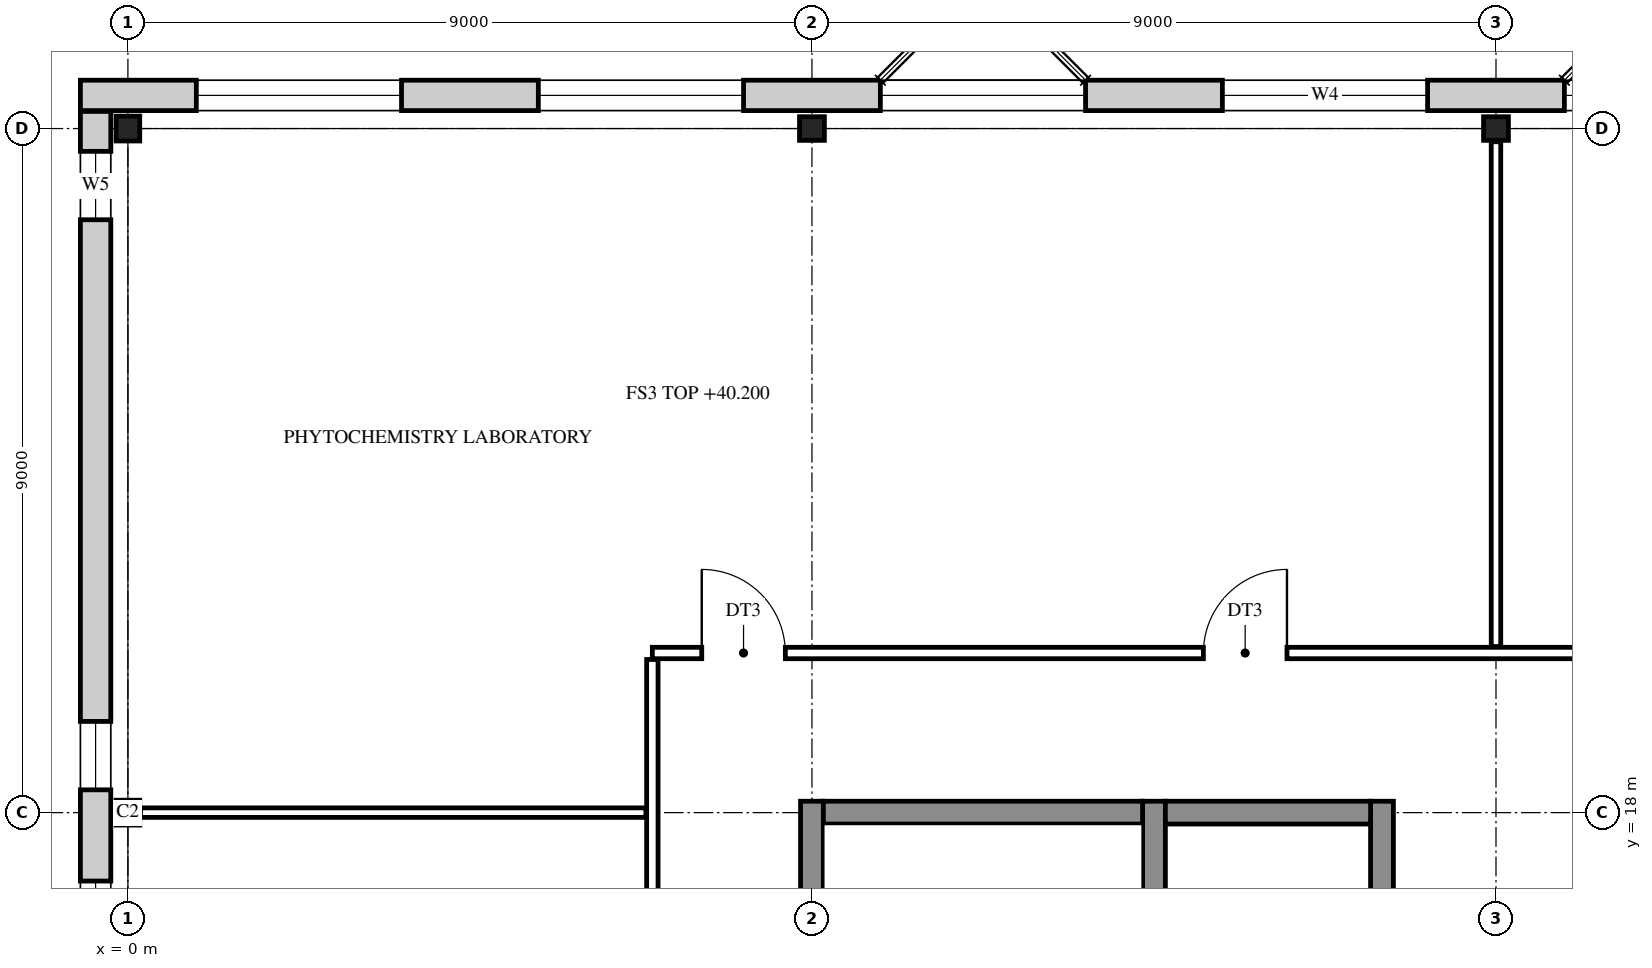
"""IFC4 building model, lengths in metres.
Left out: names, types, materials, properties, quantities, classifications, styles, units other than length and angle.
Written with IfcOpenShell. Run it as: python <this file> out.ifc"""

import sys

from ifc_helpers import new_model, si_unit, direction, frame, frame_2d, origin, origin_2d, place, context, subcontext, project, spatial, rectangle, i_section, extrude, element, fill, save


model = new_model("IFC4")
c1 = context("Model", 3, precision=1e-05, world=origin(), true_north=direction((0.0, 1.0)))
c2 = subcontext(c1, "Body", "Model", "MODEL_VIEW")
j1 = project(units=[si_unit("LENGTHUNIT", "METRE"), si_unit("PLANEANGLEUNIT", "RADIAN")], contexts=[c1])
p1 = place(None, origin())
s1 = spatial("IfcSite", under=j1, at=p1, CompositionType="ELEMENT")
p2 = place(p1, origin())
s2 = spatial("IfcBuilding", under=s1, at=p2, CompositionType="ELEMENT")
p3 = place(p2, frame((0.0, 0.0, 40.2)))
s3 = spatial("IfcBuildingStorey", under=s2, at=p3, CompositionType="ELEMENT", Elevation=40.2)
for number, where, z_axis, x_axis in (
    (1, (0.0, 18.0, 0.0), (0.0, 0.0, 1.0), (1.0, 0.0, 0.0)),
    (2, (0.0, 27.0, 0.0), (0.0, 0.0, 1.0), (1.0, 0.0, 0.0)),
    (3, (9.0, 27.0, 0.0), (0.0, 0.0, 1.0), (0.0, 1.0, 0.0)),
    (4, (18.0, 27.0, 0.0), (0.0, 0.0, 1.0), (0.0, 1.0, 0.0)),
):
    element("IfcColumn", number, at=place(p3, frame(where, z_axis=z_axis, x_axis=x_axis)), inside=s3, PredefinedType="COLUMN", context=c2, shape_type="SweptSolid", body=[
        extrude(i_section(OverallWidth=0.311, OverallDepth=0.327, WebThickness=0.016, FlangeThickness=0.025, FilletRadius=0.017, at=origin_2d()), origin(), (0.0, 0.0, 1.0), 4.2),
    ])
for number, where, z_axis, x_axis in (
    (5, (9.0, 8.85, 0.0), (0.0, 0.0, 1.0), (0.0, 1.0, 0.0)),
    (6, (13.5, 8.85, 0.0), (0.0, 0.0, 1.0), (0.0, 1.0, 0.0)),
):
    element("IfcWall", number, at=place(p3, frame(where, z_axis=z_axis, x_axis=x_axis)), inside=s3, PredefinedType="SHEAR", context=c2, shape_type="SweptSolid", body=[
        extrude(rectangle(XDim=9.3, YDim=0.3, at=frame_2d((4.65, 0.0))), origin(), (0.0, 0.0, 1.0), 4.2),
    ])
p4 = place(p3, frame((16.5, 8.85, 0.0), z_axis=(0.0, 0.0, 1.0), x_axis=(0.0, 1.0, 0.0)))
e7 = element("IfcWall", 7, at=p4, inside=s3, PredefinedType="SHEAR", context=c2, shape_type="SweptSolid", body=[
    extrude(rectangle(XDim=9.3, YDim=0.3, at=frame_2d((4.65, 0.0))), origin(), (0.0, 0.0, 1.0), 4.2),
])
p5 = place(p4, frame((1.1, 0.0, 0.0)))
e8 = element("IfcOpeningElement", 8, at=p5, cuts=e7, PredefinedType="OPENING", context=c2, shape_type="SweptSolid", body=[
    extrude(rectangle(XDim=1.1, YDim=2.1, at=frame_2d((0.55, 1.05))), frame((0.0, 0.16, 0.0), z_axis=(0.0, -1.0, 0.0), x_axis=(1.0, 0.0, 0.0)), (0.0, 0.0, 1.0), 0.32),
])
p6 = place(p4, frame((4.1, 0.0, 0.0)))
e9 = element("IfcOpeningElement", 9, at=p6, cuts=e7, PredefinedType="OPENING", context=c2, shape_type="SweptSolid", body=[
    extrude(rectangle(XDim=1.1, YDim=2.1, at=frame_2d((0.55, 1.05))), frame((0.0, 0.16, 0.0), z_axis=(0.0, -1.0, 0.0), x_axis=(1.0, 0.0, 0.0)), (0.0, 0.0, 1.0), 0.32),
])
p7 = place(p3, frame((9.15, 18.0, 0.0), z_axis=(0.0, 0.0, 1.0), x_axis=(1.0, 0.0, 0.0)))
e10 = element("IfcWall", 10, at=p7, inside=s3, PredefinedType="SHEAR", context=c2, shape_type="SweptSolid", body=[
    extrude(rectangle(XDim=4.2, YDim=0.3, at=frame_2d((2.1, 0.0))), origin(), (0.0, 0.0, 1.0), 4.2),
])
p8 = place(p3, frame((13.65, 18.0, 0.0), z_axis=(0.0, 0.0, 1.0), x_axis=(1.0, 0.0, 0.0)))
e11 = element("IfcWall", 11, at=p8, inside=s3, PredefinedType="SHEAR", context=c2, shape_type="SweptSolid", body=[
    extrude(rectangle(XDim=2.7, YDim=0.3, at=frame_2d((1.35, 0.0))), origin(), (0.0, 0.0, 1.0), 4.2),
])
p9 = place(p3, frame((-0.425, -0.225, 0.0), z_axis=(0.0, 0.0, 1.0), x_axis=(0.0, 1.0, 0.0)))
e12 = element("IfcWall", 12, at=p9, inside=s3, PredefinedType="STANDARD", context=c2, shape_type="SweptSolid", body=[
    extrude(rectangle(XDim=27.45, YDim=0.4, at=frame_2d((13.725, 0.0))), origin(), (0.0, 0.0, 1.0), 4.2),
])
p10 = place(p9, frame((0.525, 0.0, 0.9)))
e13 = element("IfcOpeningElement", 13, at=p10, cuts=e12, PredefinedType="OPENING", context=c2, shape_type="SweptSolid", body=[
    extrude(rectangle(XDim=0.9, YDim=2.0, at=frame_2d((0.45, 1.0))), frame((0.0, 0.21, 0.0), z_axis=(0.0, -1.0, 0.0), x_axis=(1.0, 0.0, 0.0)), (0.0, 0.0, 1.0), 0.42),
])
p11 = place(p9, frame((8.025, 0.0, 0.9)))
e14 = element("IfcOpeningElement", 14, at=p11, cuts=e12, PredefinedType="OPENING", context=c2, shape_type="SweptSolid", body=[
    extrude(rectangle(XDim=0.9, YDim=2.0, at=frame_2d((0.45, 1.0))), frame((0.0, 0.21, 0.0), z_axis=(0.0, -1.0, 0.0), x_axis=(1.0, 0.0, 0.0)), (0.0, 0.0, 1.0), 0.42),
])
p12 = place(p9, frame((10.125, 0.0, 0.9)))
e15 = element("IfcOpeningElement", 15, at=p12, cuts=e12, PredefinedType="OPENING", context=c2, shape_type="SweptSolid", body=[
    extrude(rectangle(XDim=2.7, YDim=2.5, at=frame_2d((1.35, 1.25))), frame((0.0, 0.21, 0.0), z_axis=(0.0, -1.0, 0.0), x_axis=(1.0, 0.0, 0.0)), (0.0, 0.0, 1.0), 0.42),
])
p13 = place(p9, frame((14.625, 0.0, 0.9)))
e16 = element("IfcOpeningElement", 16, at=p13, cuts=e12, PredefinedType="OPENING", context=c2, shape_type="SweptSolid", body=[
    extrude(rectangle(XDim=2.7, YDim=2.5, at=frame_2d((1.35, 1.25))), frame((0.0, 0.21, 0.0), z_axis=(0.0, -1.0, 0.0), x_axis=(1.0, 0.0, 0.0)), (0.0, 0.0, 1.0), 0.42),
])
p14 = place(p9, frame((18.525, 0.0, 0.9)))
e17 = element("IfcOpeningElement", 17, at=p14, cuts=e12, PredefinedType="OPENING", context=c2, shape_type="SweptSolid", body=[
    extrude(rectangle(XDim=0.9, YDim=2.0, at=frame_2d((0.45, 1.0))), frame((0.0, 0.21, 0.0), z_axis=(0.0, -1.0, 0.0), x_axis=(1.0, 0.0, 0.0)), (0.0, 0.0, 1.0), 0.42),
])
p15 = place(p9, frame((26.025, 0.0, 0.9)))
e18 = element("IfcOpeningElement", 18, at=p15, cuts=e12, PredefinedType="OPENING", context=c2, shape_type="SweptSolid", body=[
    extrude(rectangle(XDim=0.9, YDim=2.0, at=frame_2d((0.45, 1.0))), frame((0.0, 0.21, 0.0), z_axis=(0.0, -1.0, 0.0), x_axis=(1.0, 0.0, 0.0)), (0.0, 0.0, 1.0), 0.42),
])
p16 = place(p3, frame((-0.625, 27.436, 0.0), z_axis=(0.0, 0.0, 1.0), x_axis=(1.0, 0.0, 0.0)))
e19 = element("IfcWall", 19, at=p16, inside=s3, PredefinedType="STANDARD", context=c2, shape_type="SweptSolid", body=[
    extrude(rectangle(XDim=32.75, YDim=0.4, at=frame_2d((16.375, 0.0))), origin(), (0.0, 0.0, 1.0), 4.2),
])
p17 = place(p16, frame((1.525, 0.0, 0.9)))
e20 = element("IfcOpeningElement", 20, at=p17, cuts=e19, PredefinedType="OPENING", context=c2, shape_type="SweptSolid", body=[
    extrude(rectangle(XDim=2.7, YDim=2.5, at=frame_2d((1.35, 1.25))), frame((0.0, 0.21, 0.0), z_axis=(0.0, -1.0, 0.0), x_axis=(1.0, 0.0, 0.0)), (0.0, 0.0, 1.0), 0.42),
])
p18 = place(p16, frame((6.025, 0.0, 0.9)))
e21 = element("IfcOpeningElement", 21, at=p18, cuts=e19, PredefinedType="OPENING", context=c2, shape_type="SweptSolid", body=[
    extrude(rectangle(XDim=2.7, YDim=2.5, at=frame_2d((1.35, 1.25))), frame((0.0, 0.21, 0.0), z_axis=(0.0, -1.0, 0.0), x_axis=(1.0, 0.0, 0.0)), (0.0, 0.0, 1.0), 0.42),
])
p19 = place(p16, frame((10.525, 0.0, 0.9)))
e22 = element("IfcOpeningElement", 22, at=p19, cuts=e19, PredefinedType="OPENING", context=c2, shape_type="SweptSolid", body=[
    extrude(rectangle(XDim=2.7, YDim=2.5, at=frame_2d((1.35, 1.25))), frame((0.0, 0.21, 0.0), z_axis=(0.0, -1.0, 0.0), x_axis=(1.0, 0.0, 0.0)), (0.0, 0.0, 1.0), 0.42),
])
p20 = place(p16, frame((15.025, 0.0, 0.9)))
e23 = element("IfcOpeningElement", 23, at=p20, cuts=e19, PredefinedType="OPENING", context=c2, shape_type="SweptSolid", body=[
    extrude(rectangle(XDim=2.7, YDim=2.5, at=frame_2d((1.35, 1.25))), frame((0.0, 0.21, 0.0), z_axis=(0.0, -1.0, 0.0), x_axis=(1.0, 0.0, 0.0)), (0.0, 0.0, 1.0), 0.42),
])
p21 = place(p16, frame((19.525, 0.0, 0.9)))
e24 = element("IfcOpeningElement", 24, at=p21, cuts=e19, PredefinedType="OPENING", context=c2, shape_type="SweptSolid", body=[
    extrude(rectangle(XDim=2.7, YDim=2.5, at=frame_2d((1.35, 1.25))), frame((0.0, 0.21, 0.0), z_axis=(0.0, -1.0, 0.0), x_axis=(1.0, 0.0, 0.0)), (0.0, 0.0, 1.0), 0.42),
])
p22 = place(p16, frame((24.025, 0.0, 0.9)))
e25 = element("IfcOpeningElement", 25, at=p22, cuts=e19, PredefinedType="OPENING", context=c2, shape_type="SweptSolid", body=[
    extrude(rectangle(XDim=2.7, YDim=2.5, at=frame_2d((1.35, 1.25))), frame((0.0, 0.21, 0.0), z_axis=(0.0, -1.0, 0.0), x_axis=(1.0, 0.0, 0.0)), (0.0, 0.0, 1.0), 0.42),
])
p23 = place(p16, frame((28.525, 0.0, 0.9)))
e26 = element("IfcOpeningElement", 26, at=p23, cuts=e19, PredefinedType="OPENING", context=c2, shape_type="SweptSolid", body=[
    extrude(rectangle(XDim=2.7, YDim=2.5, at=frame_2d((1.35, 1.25))), frame((0.0, 0.21, 0.0), z_axis=(0.0, -1.0, 0.0), x_axis=(1.0, 0.0, 0.0)), (0.0, 0.0, 1.0), 0.42),
])
p24 = place(p3, frame((6.9, 6.985, 0.0), z_axis=(0.0, 0.0, 1.0), x_axis=(0.0, 1.0, 0.0)))
e27 = element("IfcWall", 27, at=p24, inside=s3, PredefinedType="PARTITIONING", context=c2, shape_type="SweptSolid", body=[
    extrude(rectangle(XDim=13.03, YDim=0.15, at=frame_2d((6.515, 0.0))), origin(), (0.0, 0.0, 1.0), 3.537),
])
p25 = place(p24, frame((0.465, 0.0, 0.0)))
e28 = element("IfcOpeningElement", 28, at=p25, cuts=e27, PredefinedType="OPENING", context=c2, shape_type="SweptSolid", body=[
    extrude(rectangle(XDim=1.0, YDim=2.1, at=frame_2d((0.5, 1.05))), frame((0.0, 0.085, 0.0), z_axis=(0.0, -1.0, 0.0), x_axis=(1.0, 0.0, 0.0)), (0.0, 0.0, 1.0), 0.17),
])
p26 = place(p24, frame((3.715, 0.0, 0.0)))
e29 = element("IfcOpeningElement", 29, at=p26, cuts=e27, PredefinedType="OPENING", context=c2, shape_type="SweptSolid", body=[
    extrude(rectangle(XDim=1.1, YDim=2.1, at=frame_2d((0.55, 1.05))), frame((0.0, 0.085, 0.0), z_axis=(0.0, -1.0, 0.0), x_axis=(1.0, 0.0, 0.0)), (0.0, 0.0, 1.0), 0.17),
])
p27 = place(p24, frame((8.265, 0.0, 0.0)))
e30 = element("IfcOpeningElement", 30, at=p27, cuts=e27, PredefinedType="OPENING", context=c2, shape_type="SweptSolid", body=[
    extrude(rectangle(XDim=1.0, YDim=2.1, at=frame_2d((0.5, 1.05))), frame((0.0, 0.085, 0.0), z_axis=(0.0, -1.0, 0.0), x_axis=(1.0, 0.0, 0.0)), (0.0, 0.0, 1.0), 0.17),
])
p28 = place(p3, frame((18.0, 20.185, 0.0), z_axis=(0.0, 0.0, 1.0), x_axis=(0.0, 1.0, 0.0)))
e31 = element("IfcWall", 31, at=p28, inside=s3, PredefinedType="PARTITIONING", context=c2, shape_type="SweptSolid", body=[
    extrude(rectangle(XDim=6.641, YDim=0.125, at=frame_2d((3.321, 0.0))), origin(), (0.0, 0.0, 1.0), 3.537),
])
p29 = place(p3, frame((0.166, 18.0, 0.0), z_axis=(0.0, 0.0, 1.0), x_axis=(1.0, 0.0, 0.0)))
e32 = element("IfcWall", 32, at=p29, inside=s3, PredefinedType="PARTITIONING", context=c2, shape_type="SweptSolid", body=[
    extrude(rectangle(XDim=6.649, YDim=0.125, at=frame_2d((3.325, 0.0))), origin(), (0.0, 0.0, 1.0), 3.537),
])
p30 = place(p3, frame((6.9, 20.1, 0.0), z_axis=(0.0, 0.0, 1.0), x_axis=(1.0, 0.0, 0.0)))
e33 = element("IfcWall", 33, at=p30, inside=s3, PredefinedType="PARTITIONING", context=c2, shape_type="SweptSolid", body=[
    extrude(rectangle(XDim=20.1, YDim=0.15, at=frame_2d((10.05, 0.0))), origin(), (0.0, 0.0, 1.0), 3.537),
])
p31 = place(p30, frame((7.25, 0.0, 0.0)))
e34 = element("IfcOpeningElement", 34, at=p31, cuts=e33, PredefinedType="OPENING", context=c2, shape_type="SweptSolid", body=[
    extrude(rectangle(XDim=1.1, YDim=2.1, at=frame_2d((0.55, 1.05))), frame((0.0, 0.085, 0.0), z_axis=(0.0, -1.0, 0.0), x_axis=(1.0, 0.0, 0.0)), (0.0, 0.0, 1.0), 0.17),
])
p32 = place(p30, frame((0.65, 0.0, 0.0)))
e35 = element("IfcOpeningElement", 35, at=p32, cuts=e33, PredefinedType="OPENING", context=c2, shape_type="SweptSolid", body=[
    extrude(rectangle(XDim=1.1, YDim=2.1, at=frame_2d((0.55, 1.05))), frame((0.0, 0.085, 0.0), z_axis=(0.0, -1.0, 0.0), x_axis=(1.0, 0.0, 0.0)), (0.0, 0.0, 1.0), 0.17),
])
p33 = place(p30, frame((16.25, 0.0, 0.0)))
e36 = element("IfcOpeningElement", 36, at=p33, cuts=e33, PredefinedType="OPENING", context=c2, shape_type="SweptSolid", body=[
    extrude(rectangle(XDim=1.1, YDim=2.1, at=frame_2d((0.55, 1.05))), frame((0.0, 0.085, 0.0), z_axis=(0.0, -1.0, 0.0), x_axis=(1.0, 0.0, 0.0)), (0.0, 0.0, 1.0), 0.17),
])
p34 = place(p13, origin())
e37 = element("IfcWindow", 37, at=p34, inside=s3, PartitioningType="SINGLE_PANEL", PredefinedType="WINDOW", context=c2, shape_type="SweptSolid", body=[
    extrude(rectangle(XDim=2.7, YDim=2.5, at=frame_2d((1.35, 1.25))), frame((0.0, 0.03, 0.0), z_axis=(0.0, -1.0, 0.0), x_axis=(1.0, 0.0, 0.0)), (0.0, 0.0, 1.0), 0.06),
])
fill(e16, e37)
p35 = place(p14, origin())
e38 = element("IfcWindow", 38, at=p35, inside=s3, PartitioningType="SINGLE_PANEL", PredefinedType="WINDOW", context=c2, shape_type="SweptSolid", body=[
    extrude(rectangle(XDim=0.9, YDim=2.0, at=frame_2d((0.45, 1.0))), frame((0.0, 0.03, 0.0), z_axis=(0.0, -1.0, 0.0), x_axis=(1.0, 0.0, 0.0)), (0.0, 0.0, 1.0), 0.06),
])
fill(e17, e38)
p36 = place(p15, origin())
e39 = element("IfcWindow", 39, at=p36, inside=s3, PartitioningType="SINGLE_PANEL", PredefinedType="WINDOW", context=c2, shape_type="SweptSolid", body=[
    extrude(rectangle(XDim=0.9, YDim=2.0, at=frame_2d((0.45, 1.0))), frame((0.0, 0.03, 0.0), z_axis=(0.0, -1.0, 0.0), x_axis=(1.0, 0.0, 0.0)), (0.0, 0.0, 1.0), 0.06),
])
fill(e18, e39)
p37 = place(p17, origin())
e40 = element("IfcWindow", 40, at=p37, inside=s3, PartitioningType="SINGLE_PANEL", PredefinedType="WINDOW", context=c2, shape_type="SweptSolid", body=[
    extrude(rectangle(XDim=2.7, YDim=2.5, at=frame_2d((1.35, 1.25))), frame((0.0, 0.03, 0.0), z_axis=(0.0, -1.0, 0.0), x_axis=(1.0, 0.0, 0.0)), (0.0, 0.0, 1.0), 0.06),
])
fill(e20, e40)
p38 = place(p18, origin())
e41 = element("IfcWindow", 41, at=p38, inside=s3, PartitioningType="SINGLE_PANEL", PredefinedType="WINDOW", context=c2, shape_type="SweptSolid", body=[
    extrude(rectangle(XDim=2.7, YDim=2.5, at=frame_2d((1.35, 1.25))), frame((0.0, 0.03, 0.0), z_axis=(0.0, -1.0, 0.0), x_axis=(1.0, 0.0, 0.0)), (0.0, 0.0, 1.0), 0.06),
])
fill(e21, e41)
p39 = place(p19, origin())
e42 = element("IfcWindow", 42, at=p39, inside=s3, PartitioningType="SINGLE_PANEL", PredefinedType="WINDOW", context=c2, shape_type="SweptSolid", body=[
    extrude(rectangle(XDim=2.7, YDim=2.5, at=frame_2d((1.35, 1.25))), frame((0.0, 0.03, 0.0), z_axis=(0.0, -1.0, 0.0), x_axis=(1.0, 0.0, 0.0)), (0.0, 0.0, 1.0), 0.06),
])
fill(e22, e42)
p40 = place(p20, origin())
e43 = element("IfcWindow", 43, at=p40, inside=s3, PartitioningType="SINGLE_PANEL", PredefinedType="WINDOW", context=c2, shape_type="SweptSolid", body=[
    extrude(rectangle(XDim=2.7, YDim=2.5, at=frame_2d((1.35, 1.25))), frame((0.0, 0.03, 0.0), z_axis=(0.0, -1.0, 0.0), x_axis=(1.0, 0.0, 0.0)), (0.0, 0.0, 1.0), 0.06),
])
fill(e23, e43)
p41 = place(p21, origin())
e44 = element("IfcWindow", 44, at=p41, inside=s3, PartitioningType="SINGLE_PANEL", PredefinedType="WINDOW", context=c2, shape_type="SweptSolid", body=[
    extrude(rectangle(XDim=2.7, YDim=2.5, at=frame_2d((1.35, 1.25))), frame((0.0, 0.03, 0.0), z_axis=(0.0, -1.0, 0.0), x_axis=(1.0, 0.0, 0.0)), (0.0, 0.0, 1.0), 0.06),
])
fill(e24, e44)
p42 = place(p31, origin())
e45 = element("IfcDoor", 45, at=p42, inside=s3, OperationType="SINGLE_SWING_RIGHT", PredefinedType="DOOR", context=c2, shape_type="SweptSolid", body=[
    extrude(rectangle(XDim=1.1, YDim=2.1, at=frame_2d((0.55, 1.05))), frame((0.0, 0.025, 0.0), z_axis=(0.0, -1.0, 0.0), x_axis=(1.0, 0.0, 0.0)), (0.0, 0.0, 1.0), 0.05),
])
fill(e34, e45)
p43 = place(p32, origin())
e46 = element("IfcDoor", 46, at=p43, inside=s3, OperationType="SINGLE_SWING_LEFT", PredefinedType="DOOR", context=c2, shape_type="SweptSolid", body=[
    extrude(rectangle(XDim=1.1, YDim=2.1, at=frame_2d((0.55, 1.05))), frame((0.0, 0.025, 0.0), z_axis=(0.0, -1.0, 0.0), x_axis=(1.0, 0.0, 0.0)), (0.0, 0.0, 1.0), 0.05),
])
fill(e35, e46)
save(model, sys.argv[1])
